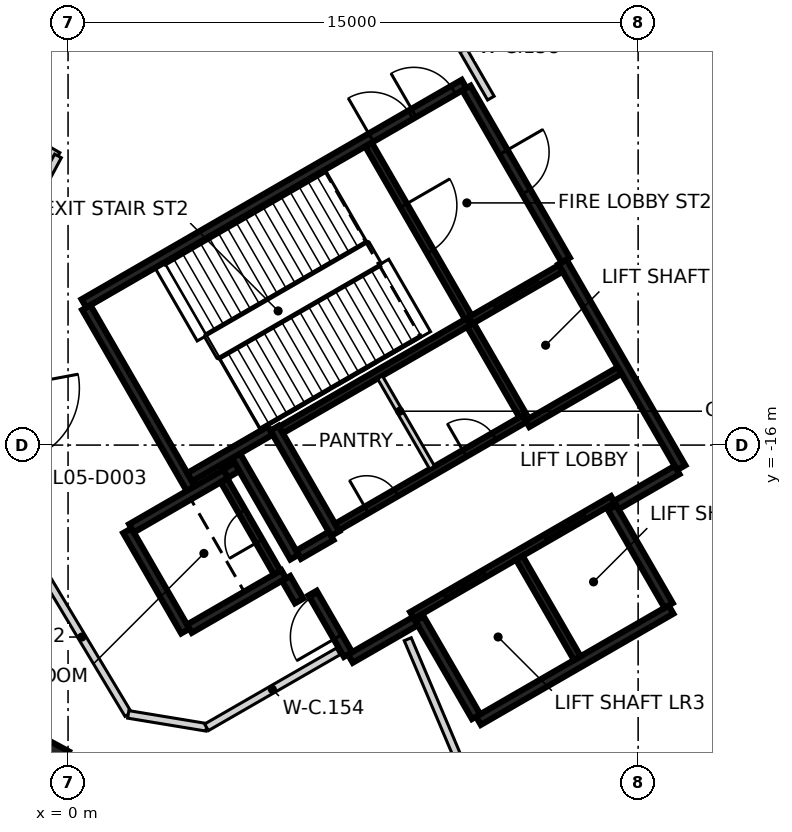
"""IFC4 building model, lengths in metres.
Left out: names, types, materials, properties, quantities, classifications, styles, units other than length and angle.
Written with IfcOpenShell. Run it as: python <this file> out.ifc"""

import sys

from ifc_helpers import new_model, si_unit, direction, frame, frame_2d, origin, origin_2d, place, context, subcontext, project, spatial, rectangle, extrude, element, fill, save


model = new_model("IFC4")
c1 = context("Model", 3, precision=1e-05, world=origin(), true_north=direction((0.0, 1.0)))
c2 = subcontext(c1, "Body", "Model", "MODEL_VIEW")
j1 = project(units=[si_unit("LENGTHUNIT", "METRE"), si_unit("PLANEANGLEUNIT", "RADIAN")], contexts=[c1])
p1 = place(None, origin())
s1 = spatial("IfcSite", under=j1, at=p1, CompositionType="ELEMENT")
p2 = place(p1, origin())
s2 = spatial("IfcBuilding", under=s1, at=p2, CompositionType="ELEMENT")
p3 = place(p2, frame((0.0, 0.0, 29.5)))
s3 = spatial("IfcBuildingStorey", under=s2, at=p3, CompositionType="ELEMENT", Elevation=29.5)
p4 = place(p3, frame((-1.197, -24.423, -0.4), z_axis=(0.0, 0.0, 1.0), x_axis=(0.476198301069, 0.879337920289, 0.0)))
e1 = element("IfcColumn", 1, at=p4, inside=s3, PredefinedType="COLUMN", context=c2, shape_type="SweptSolid", body=[
    extrude(rectangle(XDim=1.8, YDim=1.8, at=origin_2d()), origin(), (0.0, 0.0, 1.0), 3.025),
])
p5 = place(p3, frame((0.417, -12.273, 0.0), z_axis=(0.0, 0.0, 1.0), x_axis=(0.866021906294, 0.500006057782, 0.0)))
e2 = element("IfcWall", 2, at=p5, inside=s3, PredefinedType="SHEAR", context=c2, shape_type="SweptSolid", body=[
    extrude(rectangle(XDim=11.55, YDim=0.25, at=frame_2d((5.775, 0.0))), origin(), (0.0, 0.0, 1.0), 5.025),
])
p6 = place(p5, frame((10.025, 0.0, 0.0)))
e3 = element("IfcOpeningElement", 3, at=p6, cuts=e2, PredefinedType="OPENING", context=c2, shape_type="SweptSolid", body=[
    extrude(rectangle(XDim=1.2, YDim=2.1, at=frame_2d((0.6, 1.05))), frame((0.0, 0.135, 0.0), z_axis=(0.0, -1.0, 0.0), x_axis=(1.0, 0.0, 0.0)), (0.0, 0.0, 1.0), 0.27),
])
p7 = place(p5, frame((8.725, 0.0, 0.0)))
e4 = element("IfcOpeningElement", 4, at=p7, cuts=e2, PredefinedType="OPENING", context=c2, shape_type="SweptSolid", body=[
    extrude(rectangle(XDim=1.2, YDim=2.1, at=frame_2d((0.6, 1.05))), frame((0.0, 0.135, 0.0), z_axis=(0.0, -1.0, 0.0), x_axis=(1.0, 0.0, 0.0)), (0.0, 0.0, 1.0), 0.27),
])
p8 = place(p3, frame((13.008, -11.181, 0.0), z_axis=(0.0, 0.0, 1.0), x_axis=(0.500004234368, -0.866022959057, 0.0)))
e5 = element("IfcWall", 5, at=p8, inside=s3, PredefinedType="SHEAR", context=c2, shape_type="SweptSolid", body=[
    extrude(rectangle(XDim=6.25, YDim=0.25, at=frame_2d((3.125, 0.0))), origin(), (0.0, 0.0, 1.0), 5.025),
])
p9 = place(p3, frame((15.865, -20.328, 0.0), z_axis=(0.0, 0.0, 1.0), x_axis=(-0.86602852612, -0.499994591916, 0.0)))
e6 = element("IfcWall", 6, at=p9, inside=s3, PredefinedType="SHEAR", context=c2, shape_type="SweptSolid", body=[
    extrude(rectangle(XDim=5.85, YDim=0.25, at=frame_2d((2.925, 0.0))), origin(), (0.0, 0.0, 1.0), 5.025),
])
p10 = place(p3, frame((3.235, -17.153, 0.0), z_axis=(0.0, 0.0, 1.0), x_axis=(-0.500008851346, 0.866020293397, 0.0)))
e7 = element("IfcWall", 7, at=p10, inside=s3, PredefinedType="SHEAR", context=c2, shape_type="SweptSolid", body=[
    extrude(rectangle(XDim=5.51, YDim=0.25, at=frame_2d((2.755, 0.0))), origin(), (0.0, 0.0, 1.0), 5.025),
])
p11 = place(p3, frame((10.483, -6.606, 0.0), z_axis=(0.0, 0.0, 1.0), x_axis=(0.49999885962, -0.866026062182, 0.0)))
e8 = element("IfcWall", 8, at=p11, inside=s3, PredefinedType="SHEAR", context=c2, shape_type="SweptSolid", body=[
    extrude(rectangle(XDim=5.225, YDim=0.25, at=frame_2d((2.612, 0.0))), origin(), (0.0, 0.0, 1.0), 5.025),
])
p12 = place(p11, frame((1.95, 0.0, 0.0)))
e9 = element("IfcOpeningElement", 9, at=p12, cuts=e8, PredefinedType="OPENING", context=c2, shape_type="SweptSolid", body=[
    extrude(rectangle(XDim=1.2, YDim=2.1, at=frame_2d((0.6, 1.05))), frame((0.0, 0.135, 0.0), z_axis=(0.0, -1.0, 0.0), x_axis=(1.0, 0.0, 0.0)), (0.0, 0.0, 1.0), 0.27),
])
p13 = place(p3, frame((7.031, -18.327, 0.0), z_axis=(0.0, 0.0, 1.0), x_axis=(-0.499971222258, 0.866042017984, 0.0)))
e10 = element("IfcWall", 10, at=p13, inside=s3, PredefinedType="SHEAR", context=c2, shape_type="SweptSolid", body=[
    extrude(rectangle(XDim=3.2, YDim=0.25, at=frame_2d((1.6, 0.0))), origin(), (0.0, 0.0, 1.0), 5.025),
])
for number, where, z_axis, x_axis in (
    (11, (14.315, -17.644, 0.0), (0.0, 0.0, 1.0), (0.5, -0.866, 0.0)),
    (12, (10.736, -23.145, 0.0), (0.0, 0.0, 1.0), (-0.5, 0.866, 0.0)),
):
    element("IfcWall", number, at=place(p3, frame(where, z_axis=z_axis, x_axis=x_axis)), inside=s3, PredefinedType="SHEAR", context=c2, shape_type="SweptSolid", body=[
        extrude(rectangle(XDim=2.974, YDim=0.25, at=frame_2d((1.487, 0.0))), origin(), (0.0, 0.0, 1.0), 5.025),
    ])
p14 = place(p3, frame((3.085, -20.894, 0.0), z_axis=(0.0, 0.0, 1.0), x_axis=(-0.499978833458, 0.866037623948, 0.0)))
e13 = element("IfcWall", 13, at=p14, inside=s3, PredefinedType="SHEAR", context=c2, shape_type="SweptSolid", body=[
    extrude(rectangle(XDim=3.05, YDim=0.25, at=frame_2d((1.525, 0.0))), origin(), (0.0, 0.0, 1.0), 5.025),
])
p15 = place(p3, frame((1.669, -18.19, 0.0), z_axis=(0.0, 0.0, 1.0), x_axis=(0.866042235819, 0.499970844928, 0.0)))
e14 = element("IfcWall", 14, at=p15, inside=s3, PredefinedType="SHEAR", context=c2, shape_type="SweptSolid", body=[
    extrude(rectangle(XDim=2.865, YDim=0.25, at=frame_2d((1.432, 0.0))), origin(), (0.0, 0.0, 1.0), 5.025),
])
p16 = place(p3, frame((5.675, -19.399, 0.0), z_axis=(0.0, 0.0, 1.0), x_axis=(-0.866026637627, -0.499997862916, 0.0)))
e15 = element("IfcWall", 15, at=p16, inside=s3, PredefinedType="SHEAR", context=c2, shape_type="SweptSolid", body=[
    extrude(rectangle(XDim=2.865, YDim=0.25, at=frame_2d((1.432, 0.0))), origin(), (0.0, 0.0, 1.0), 5.025),
])
p17 = place(p3, frame((4.414, -16.276, 0.0), z_axis=(0.0, 0.0, 1.0), x_axis=(0.500003324108, -0.866023484601, 0.0)))
e16 = element("IfcWall", 16, at=p17, inside=s3, PredefinedType="SHEAR", context=c2, shape_type="SweptSolid", body=[
    extrude(rectangle(XDim=3.085, YDim=0.25, at=frame_2d((1.542, 0.0))), origin(), (0.0, 0.0, 1.0), 5.025),
])
p18 = place(p3, frame((5.322, -15.619, 0.0), z_axis=(0.0, 0.0, 1.0), x_axis=(-0.866026229868, -0.499998569178, 0.0)))
e17 = element("IfcWall", 17, at=p18, inside=s3, PredefinedType="SHEAR", context=c2, shape_type="SweptSolid", body=[
    extrude(rectangle(XDim=2.449, YDim=0.25, at=frame_2d((1.225, 0.0))), origin(), (0.0, 0.0, 1.0), 5.025),
])
p19 = place(p3, frame((9.14, -20.631, 0.0), z_axis=(0.0, 0.0, 1.0), x_axis=(-0.866043531843, -0.499968599967, 0.0)))
e18 = element("IfcWall", 18, at=p19, inside=s3, PredefinedType="SHEAR", context=c2, shape_type="SweptSolid", body=[
    extrude(rectangle(XDim=1.975, YDim=0.25, at=frame_2d((0.987, 0.0))), origin(), (0.0, 0.0, 1.0), 5.025),
])
p20 = place(p3, frame((16.025, -16.656, 0.0), z_axis=(0.0, 0.0, 1.0), x_axis=(-0.866016279763, -0.500015802937, 0.0)))
e19 = element("IfcWall", 19, at=p20, inside=s3, PredefinedType="SHEAR", context=c2, shape_type="SweptSolid", body=[
    extrude(rectangle(XDim=1.849, YDim=0.25, at=frame_2d((0.925, 0.0))), origin(), (0.0, 0.0, 1.0), 5.025),
])
p21 = place(p3, frame((7.367, -21.51, 0.0), z_axis=(0.0, 0.0, 1.0), x_axis=(-0.499983108224, 0.866035156036, 0.0)))
e20 = element("IfcWall", 20, at=p21, inside=s3, PredefinedType="SHEAR", context=c2, shape_type="SweptSolid", body=[
    extrude(rectangle(XDim=1.865, YDim=0.25, at=frame_2d((0.932, 0.0))), origin(), (0.0, 0.0, 1.0), 5.025),
])
p22 = place(p21, frame((0.535, 0.0, 0.0)))
e21 = element("IfcOpeningElement", 21, at=p22, cuts=e20, PredefinedType="OPENING", context=c2, shape_type="SweptSolid", body=[
    extrude(rectangle(XDim=1.25, YDim=2.1, at=frame_2d((0.625, 1.05))), frame((0.0, 0.135, 0.0), z_axis=(0.0, -1.0, 0.0), x_axis=(1.0, 0.0, 0.0)), (0.0, 0.0, 1.0), 0.27),
])
p23 = place(p3, frame((6.065, -18.885, 0.0), z_axis=(0.0, 0.0, 1.0), x_axis=(0.866017078145, 0.500014420154, 0.0)))
e22 = element("IfcWall", 22, at=p23, inside=s3, PredefinedType="SHEAR", context=c2, shape_type="SweptSolid", body=[
    extrude(rectangle(XDim=0.989, YDim=0.25, at=frame_2d((0.495, 0.0))), origin(), (0.0, 0.0, 1.0), 5.025),
])
p24 = place(p3, frame((6.08, -20.1, 0.0), z_axis=(0.0, 0.0, 1.0), x_axis=(-0.500051773299, 0.865995510393, 0.0)))
e23 = element("IfcWall", 23, at=p24, inside=s3, PredefinedType="SHEAR", context=c2, shape_type="SweptSolid", body=[
    extrude(rectangle(XDim=0.685, YDim=0.25, at=frame_2d((0.342, 0.0))), origin(), (0.0, 0.0, 1.0), 5.025),
])
p25 = place(p3, frame((4.145, -16.749, 0.0), z_axis=(0.0, 0.0, 1.0), x_axis=(0.866185586049, 0.49972245349, 0.0)))
e24 = element("IfcWall", 24, at=p25, inside=s3, PredefinedType="SHEAR", context=c2, shape_type="SweptSolid", body=[
    extrude(rectangle(XDim=0.344, YDim=0.25, at=frame_2d((0.172, 0.0))), origin(), (0.0, 0.0, 1.0), 5.025),
])
p26 = place(p3, frame((9.052, -20.48, 0.0), z_axis=(0.0, 0.0, 1.0), x_axis=(0.866030299012, 0.499991521122, 0.0)))
e25 = element("IfcWall", 25, at=p26, inside=s3, PredefinedType="SHEAR", context=c2, shape_type="SweptSolid", body=[
    extrude(rectangle(XDim=6.1, YDim=0.2, at=frame_2d((3.05, 0.0))), origin(), (0.0, 0.0, 1.0), 5.025),
])
p27 = place(p26, frame((1.0, 0.0, 0.0)))
e26 = element("IfcOpeningElement", 26, at=p27, cuts=e25, PredefinedType="OPENING", context=c2, shape_type="SweptSolid", body=[
    extrude(rectangle(XDim=1.2, YDim=2.1, at=frame_2d((0.6, 1.05))), frame((0.0, 0.11, 0.0), z_axis=(0.0, -1.0, 0.0), x_axis=(1.0, 0.0, 0.0)), (0.0, 0.0, 1.0), 0.22),
])
p28 = place(p26, frame((4.05, 0.0, 0.0)))
e27 = element("IfcOpeningElement", 27, at=p28, cuts=e25, PredefinedType="OPENING", context=c2, shape_type="SweptSolid", body=[
    extrude(rectangle(XDim=1.2, YDim=2.1, at=frame_2d((0.6, 1.05))), frame((0.0, 0.11, 0.0), z_axis=(0.0, -1.0, 0.0), x_axis=(1.0, 0.0, 0.0)), (0.0, 0.0, 1.0), 0.22),
])
p29 = place(p3, frame((10.538, -12.752, 0.0), z_axis=(0.0, 0.0, 1.0), x_axis=(-0.866038630372, -0.499977090179, 0.0)))
e28 = element("IfcWall", 28, at=p29, inside=s3, PredefinedType="SHEAR", context=c2, shape_type="SweptSolid", body=[
    extrude(rectangle(XDim=5.699, YDim=0.2, at=frame_2d((2.85, 0.0))), origin(), (0.0, 0.0, 1.0), 5.025),
])
p30 = place(p3, frame((7.077, -18.156, 0.0), z_axis=(0.0, 0.0, 1.0), x_axis=(0.866038630372, 0.499977090179, 0.0)))
e29 = element("IfcWall", 29, at=p30, inside=s3, PredefinedType="SHEAR", context=c2, shape_type="SweptSolid", body=[
    extrude(rectangle(XDim=5.699, YDim=0.2, at=frame_2d((2.85, 0.0))), origin(), (0.0, 0.0, 1.0), 5.025),
])
p31 = place(p30, frame((0.899, 0.0, 0.0)))
e30 = element("IfcOpeningElement", 30, at=p31, cuts=e29, PredefinedType="OPENING", context=c2, shape_type="SweptSolid", body=[
    extrude(rectangle(XDim=0.9, YDim=2.1, at=frame_2d((0.45, 1.05))), frame((0.0, 0.11, 0.0), z_axis=(0.0, -1.0, 0.0), x_axis=(1.0, 0.0, 0.0)), (0.0, 0.0, 1.0), 0.22),
])
p32 = place(p30, frame((3.874, 0.0, 0.0)))
e31 = element("IfcOpeningElement", 31, at=p32, cuts=e29, PredefinedType="OPENING", context=c2, shape_type="SweptSolid", body=[
    extrude(rectangle(XDim=0.9, YDim=2.1, at=frame_2d((0.45, 1.05))), frame((0.0, 0.11, 0.0), z_axis=(0.0, -1.0, 0.0), x_axis=(1.0, 0.0, 0.0)), (0.0, 0.0, 1.0), 0.22),
])
p33 = place(p3, frame((7.906, -8.094, 0.0), z_axis=(0.0, 0.0, 1.0), x_axis=(0.500024287448, -0.866011380966, 0.0)))
e32 = element("IfcWall", 32, at=p33, inside=s3, PredefinedType="SHEAR", context=c2, shape_type="SweptSolid", body=[
    extrude(rectangle(XDim=5.251, YDim=0.2, at=frame_2d((2.625, 0.0))), origin(), (0.0, 0.0, 1.0), 5.025),
])
p34 = place(p33, frame((1.849, 0.0, 0.0)))
e33 = element("IfcOpeningElement", 33, at=p34, cuts=e32, PredefinedType="OPENING", context=c2, shape_type="SweptSolid", body=[
    extrude(rectangle(XDim=1.4, YDim=2.1, at=frame_2d((0.7, 1.05))), frame((0.0, 0.11, 0.0), z_axis=(0.0, -1.0, 0.0), x_axis=(1.0, 0.0, 0.0)), (0.0, 0.0, 1.0), 0.22),
])
p35 = place(p3, frame((11.875, -18.967, 0.0), z_axis=(0.0, 0.0, 1.0), x_axis=(0.49998131003, -0.866036194175, 0.0)))
e34 = element("IfcWall", 34, at=p35, inside=s3, PredefinedType="SHEAR", context=c2, shape_type="SweptSolid", body=[
    extrude(rectangle(XDim=3.048, YDim=0.2, at=frame_2d((1.524, 0.0))), origin(), (0.0, 0.0, 1.0), 5.025),
])
p36 = place(p3, frame((5.503, -19.352, 0.0), z_axis=(0.0, 0.0, 1.0), x_axis=(-0.499986818241, 0.866033014143, 0.0)))
e35 = element("IfcWall", 35, at=p36, inside=s3, PredefinedType="SHEAR", context=c2, shape_type="SweptSolid", body=[
    extrude(rectangle(XDim=2.798, YDim=0.2, at=frame_2d((1.399, 0.0))), origin(), (0.0, 0.0, 1.0), 5.025),
])
p37 = place(p36, frame((0.949, 0.0, 0.0)))
e36 = element("IfcOpeningElement", 36, at=p37, cuts=e35, PredefinedType="OPENING", context=c2, shape_type="SweptSolid", body=[
    extrude(rectangle(XDim=0.9, YDim=2.1, at=frame_2d((0.45, 1.05))), frame((0.0, 0.11, 0.0), z_axis=(0.0, -1.0, 0.0), x_axis=(1.0, 0.0, 0.0)), (0.0, 0.0, 1.0), 0.22),
])
p38 = place(p3, frame((11.963, -15.22, 0.0), z_axis=(0.0, 0.0, 1.0), x_axis=(-0.500034990121, 0.866005201286, 0.0)))
e37 = element("IfcWall", 37, at=p38, inside=s3, PredefinedType="SHEAR", context=c2, shape_type="SweptSolid", body=[
    extrude(rectangle(XDim=2.75, YDim=0.2, at=frame_2d((1.375, 0.0))), origin(), (0.0, 0.0, 1.0), 5.025),
])
p39 = place(p3, frame((10.587, -12.723, 0.0), z_axis=(0.0, 0.0, 1.0), x_axis=(0.866037306777, 0.499979382845, 0.0)))
e38 = element("IfcWall", 38, at=p39, inside=s3, PredefinedType="SHEAR", context=c2, shape_type="SweptSolid", body=[
    extrude(rectangle(XDim=2.742, YDim=0.2, at=frame_2d((1.371, 0.0))), origin(), (0.0, 0.0, 1.0), 5.025),
])
p40 = place(p39, frame((0.743, 0.0, 0.0)))
e39 = element("IfcOpeningElement", 39, at=p40, cuts=e38, PredefinedType="OPENING", context=c2, shape_type="SweptSolid", body=[
    extrude(rectangle(XDim=1.3, YDim=2.1, at=frame_2d((0.65, 1.05))), frame((0.0, 0.11, 0.0), z_axis=(0.0, -1.0, 0.0), x_axis=(1.0, 0.0, 0.0)), (0.0, 0.0, 1.0), 0.22),
])
p41 = place(p3, frame((14.512, -14.037, 0.0), z_axis=(0.0, 0.0, 1.0), x_axis=(-0.866044696403, -0.499966582715, 0.0)))
e40 = element("IfcWall", 40, at=p41, inside=s3, PredefinedType="SHEAR", context=c2, shape_type="SweptSolid", body=[
    extrude(rectangle(XDim=2.799, YDim=0.2, at=frame_2d((1.399, 0.0))), origin(), (0.0, 0.0, 1.0), 5.025),
])
p42 = place(p3, frame((8.207, -14.214, 0.0), z_axis=(0.0, 0.0, 1.0), x_axis=(0.50002746344, -0.86600954718, 0.0)))
e41 = element("IfcWall", 41, at=p42, inside=s3, PredefinedType="PARTITIONING", context=c2, shape_type="SweptSolid", body=[
    extrude(rectangle(XDim=2.748, YDim=0.15, at=frame_2d((1.374, 0.0))), origin(), (0.0, 0.0, 1.0), 5.025),
])
p43 = place(p3, frame((-8.462, -3.659, 0.0), z_axis=(0.0, 0.0, 1.0), x_axis=(0.865933840923, -0.500158558005, 0.0)))
e42 = element("IfcWall", 42, at=p43, inside=s3, PredefinedType="PARTITIONING", context=c2, shape_type="SweptSolid", body=[
    extrude(rectangle(XDim=9.465, YDim=0.2, at=frame_2d((4.733, 0.0))), origin(), (0.0, 0.0, 1.0), 5.025),
])
p44 = place(p43, frame((1.397, 0.0, 0.0)))
e43 = element("IfcOpeningElement", 43, at=p44, cuts=e42, PredefinedType="OPENING", context=c2, shape_type="SweptSolid", body=[
    extrude(rectangle(XDim=2.0, YDim=2.1, at=frame_2d((1.0, 1.05))), frame((0.0, 0.11, 0.0), z_axis=(0.0, -1.0, 0.0), x_axis=(1.0, 0.0, 0.0)), (0.0, 0.0, 1.0), 0.22),
])
p45 = place(p3, frame((-2.178, -11.955, 0.0), z_axis=(0.0, 0.0, 1.0), x_axis=(0.473055484912, 0.881032637417, 0.0)))
e44 = element("IfcWall", 44, at=p45, inside=s3, PredefinedType="PARTITIONING", context=c2, shape_type="SweptSolid", body=[
    extrude(rectangle(XDim=4.044, YDim=0.2, at=frame_2d((2.022, 0.0))), origin(), (0.0, 0.0, 1.0), 5.025),
])
p46 = place(p3, frame((-0.858, -19.015, 0.0), z_axis=(0.0, 0.0, 1.0), x_axis=(0.514382306928, -0.857560984606, 0.0)))
e45 = element("IfcWall", 45, at=p46, inside=s3, PredefinedType="PARTITIONING", context=c2, shape_type="SweptSolid", body=[
    extrude(rectangle(XDim=4.747, YDim=0.2, at=frame_2d((2.374, 0.0))), origin(), (0.0, 0.0, 1.0), 5.025),
])
p47 = place(p3, frame((1.584, -23.086, 0.0), z_axis=(0.0, 0.0, 1.0), x_axis=(0.986633159246, -0.162957077405, 0.0)))
e46 = element("IfcWall", 46, at=p47, inside=s3, PredefinedType="PARTITIONING", context=c2, shape_type="SweptSolid", body=[
    extrude(rectangle(XDim=2.087, YDim=0.2, at=frame_2d((1.043, 0.0))), origin(), (0.0, 0.0, 1.0), 5.025),
])
p48 = place(p3, frame((3.643, -23.426, 0.0), z_axis=(0.0, 0.0, 1.0), x_axis=(0.866448769737, 0.499265990652, 0.0)))
e47 = element("IfcWall", 47, at=p48, inside=s3, PredefinedType="PARTITIONING", context=c2, shape_type="SweptSolid", body=[
    extrude(rectangle(XDim=3.998, YDim=0.2, at=frame_2d((1.999, 0.0))), origin(), (0.0, 0.0, 1.0), 5.025),
])
p49 = place(p3, frame((9.6, -4.229, 0.0), z_axis=(0.0, 0.0, 1.0), x_axis=(0.500013496215, -0.866017611601, 0.0)))
e48 = element("IfcWall", 48, at=p49, inside=s3, PredefinedType="PARTITIONING", context=c2, shape_type="SweptSolid", body=[
    extrude(rectangle(XDim=3.05, YDim=0.2, at=frame_2d((1.525, 0.0))), origin(), (0.0, 0.0, 1.0), 5.025),
])
p50 = place(p3, frame((8.938, -21.108, 0.0), z_axis=(0.0, 0.0, 1.0), x_axis=(0.389872668815, -0.920868775728, 0.0)))
e49 = element("IfcWall", 49, at=p50, inside=s3, PredefinedType="PARTITIONING", context=c2, shape_type="SweptSolid", body=[
    extrude(rectangle(XDim=10.029, YDim=0.2, at=frame_2d((5.014, 0.0))), origin(), (0.0, 0.0, 1.0), 5.025),
])
p51 = place(p40, origin())
e50 = element("IfcDoor", 50, at=p51, inside=s3, OperationType="SLIDING_TO_LEFT", PredefinedType="DOOR", context=c2, shape_type="SweptSolid", body=[
    extrude(rectangle(XDim=1.3, YDim=2.1, at=frame_2d((0.65, 1.05))), frame((0.0, 0.025, 0.0), z_axis=(0.0, -1.0, 0.0), x_axis=(1.0, 0.0, 0.0)), (0.0, 0.0, 1.0), 0.05),
])
fill(e39, e50)
p52 = place(p27, origin())
e51 = element("IfcDoor", 51, at=p52, inside=s3, OperationType="DOUBLE_DOOR_SLIDING", PredefinedType="DOOR", context=c2, shape_type="SweptSolid", body=[
    extrude(rectangle(XDim=1.2, YDim=2.1, at=frame_2d((0.6, 1.05))), frame((0.0, 0.025, 0.0), z_axis=(0.0, -1.0, 0.0), x_axis=(1.0, 0.0, 0.0)), (0.0, 0.0, 1.0), 0.05),
])
fill(e26, e51)
p53 = place(p28, origin())
e52 = element("IfcDoor", 52, at=p53, inside=s3, OperationType="DOUBLE_DOOR_SLIDING", PredefinedType="DOOR", context=c2, shape_type="SweptSolid", body=[
    extrude(rectangle(XDim=1.2, YDim=2.1, at=frame_2d((0.6, 1.05))), frame((0.0, 0.025, 0.0), z_axis=(0.0, -1.0, 0.0), x_axis=(1.0, 0.0, 0.0)), (0.0, 0.0, 1.0), 0.05),
])
fill(e27, e52)
p54 = place(p22, origin())
e53 = element("IfcDoor", 53, at=p54, inside=s3, OperationType="SINGLE_SWING_LEFT", PredefinedType="DOOR", context=c2, shape_type="SweptSolid", body=[
    extrude(rectangle(XDim=1.25, YDim=2.1, at=frame_2d((0.625, 1.05))), frame((0.0, 0.025, 0.0), z_axis=(0.0, -1.0, 0.0), x_axis=(1.0, 0.0, 0.0)), (0.0, 0.0, 1.0), 0.05),
])
fill(e21, e53)
p55 = place(p6, origin())
e54 = element("IfcDoor", 54, at=p55, inside=s3, OperationType="SINGLE_SWING_LEFT", PredefinedType="DOOR", context=c2, shape_type="SweptSolid", body=[
    extrude(rectangle(XDim=1.2, YDim=2.1, at=frame_2d((0.6, 1.05))), frame((0.0, 0.025, 0.0), z_axis=(0.0, -1.0, 0.0), x_axis=(1.0, 0.0, 0.0)), (0.0, 0.0, 1.0), 0.05),
])
fill(e3, e54)
p56 = place(p7, origin())
e55 = element("IfcDoor", 55, at=p56, inside=s3, OperationType="SINGLE_SWING_RIGHT", PredefinedType="DOOR", context=c2, shape_type="SweptSolid", body=[
    extrude(rectangle(XDim=1.2, YDim=2.1, at=frame_2d((0.6, 1.05))), frame((0.0, 0.025, 0.0), z_axis=(0.0, -1.0, 0.0), x_axis=(1.0, 0.0, 0.0)), (0.0, 0.0, 1.0), 0.05),
])
fill(e4, e55)
p57 = place(p34, origin())
e56 = element("IfcDoor", 56, at=p57, inside=s3, OperationType="SINGLE_SWING_LEFT", PredefinedType="DOOR", context=c2, shape_type="SweptSolid", body=[
    extrude(rectangle(XDim=1.4, YDim=2.1, at=frame_2d((0.7, 1.05))), frame((0.0, 0.025, 0.0), z_axis=(0.0, -1.0, 0.0), x_axis=(1.0, 0.0, 0.0)), (0.0, 0.0, 1.0), 0.05),
])
fill(e33, e56)
p58 = place(p31, origin())
e57 = element("IfcDoor", 57, at=p58, inside=s3, OperationType="SINGLE_SWING_RIGHT", PredefinedType="DOOR", context=c2, shape_type="SweptSolid", body=[
    extrude(rectangle(XDim=0.9, YDim=2.1, at=frame_2d((0.45, 1.05))), frame((0.0, 0.025, 0.0), z_axis=(0.0, -1.0, 0.0), x_axis=(1.0, 0.0, 0.0)), (0.0, 0.0, 1.0), 0.05),
])
fill(e30, e57)
p59 = place(p32, origin())
e58 = element("IfcDoor", 58, at=p59, inside=s3, OperationType="SINGLE_SWING_LEFT", PredefinedType="DOOR", context=c2, shape_type="SweptSolid", body=[
    extrude(rectangle(XDim=0.9, YDim=2.1, at=frame_2d((0.45, 1.05))), frame((0.0, 0.025, 0.0), z_axis=(0.0, -1.0, 0.0), x_axis=(1.0, 0.0, 0.0)), (0.0, 0.0, 1.0), 0.05),
])
fill(e31, e58)
p60 = place(p37, origin())
e59 = element("IfcDoor", 59, at=p60, inside=s3, OperationType="SINGLE_SWING_RIGHT", PredefinedType="DOOR", context=c2, shape_type="SweptSolid", body=[
    extrude(rectangle(XDim=0.9, YDim=2.1, at=frame_2d((0.45, 1.05))), frame((0.0, 0.025, 0.0), z_axis=(0.0, -1.0, 0.0), x_axis=(1.0, 0.0, 0.0)), (0.0, 0.0, 1.0), 0.05),
])
fill(e36, e59)
p61 = place(p12, origin())
e60 = element("IfcDoor", 60, at=p61, inside=s3, OperationType="SINGLE_SWING_RIGHT", PredefinedType="DOOR", context=c2, shape_type="SweptSolid", body=[
    extrude(rectangle(XDim=1.2, YDim=2.1, at=frame_2d((0.6, 1.05))), frame((0.0, 0.025, 0.0), z_axis=(0.0, -1.0, 0.0), x_axis=(1.0, 0.0, 0.0)), (0.0, 0.0, 1.0), 0.05),
])
fill(e9, e60)
save(model, sys.argv[1])
